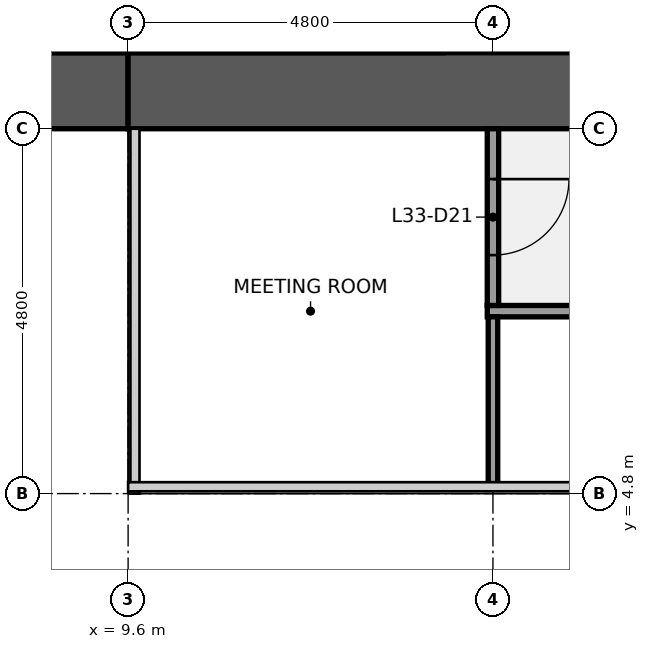
"""IFC4 building model, lengths in metres.
Left out: names, types, materials, properties, quantities, classifications, styles, units other than length and angle.
Written with IfcOpenShell. Run it as: python <this file> out.ifc"""

import sys

from ifc_helpers import new_model, si_unit, direction, frame, frame_2d, origin, place, context, subcontext, project, spatial, rectangle, extrude, element, fill, save


model = new_model("IFC4")
c1 = context("Model", 3, precision=1e-05, world=origin(), true_north=direction((0.0, 1.0)))
c2 = subcontext(c1, "Body", "Model", "MODEL_VIEW")
j1 = project(units=[si_unit("LENGTHUNIT", "METRE"), si_unit("PLANEANGLEUNIT", "RADIAN")], contexts=[c1])
p1 = place(None, origin())
s1 = spatial("IfcSite", under=j1, at=p1, CompositionType="ELEMENT")
p2 = place(p1, origin())
s2 = spatial("IfcBuilding", under=s1, at=p2, CompositionType="ELEMENT")
p3 = place(p2, frame((0.0, 0.0, 152.1)))
s3 = spatial("IfcBuildingStorey", under=s2, at=p3, CompositionType="ELEMENT", Elevation=152.1)
p4 = place(p3, frame((9.6, 10.1, 0.0), z_axis=(0.0, 0.0, 1.0), x_axis=(-1.0, 0.0, 0.0)))
e1 = element("IfcWall", 1, at=p4, inside=s3, PredefinedType="SHEAR", context=c2, shape_type="SweptSolid", body=[
    extrude(rectangle(XDim=8.6, YDim=1.0, at=frame_2d((4.3, 0.0))), origin(), (0.0, 0.0, 1.0), 3.84),
])
p5 = place(p4, frame((1.5, 0.0, 0.9)))
e2 = element("IfcOpeningElement", 2, at=p5, cuts=e1, PredefinedType="OPENING", context=c2, shape_type="SweptSolid", body=[
    extrude(rectangle(XDim=1.8, YDim=1.5, at=frame_2d((0.9, 0.75))), frame((0.0, 0.51, 0.0), z_axis=(0.0, -1.0, 0.0), x_axis=(1.0, 0.0, 0.0)), (0.0, 0.0, 1.0), 1.02),
])
p6 = place(p3, frame((18.2, 10.1, 0.0), z_axis=(0.0, 0.0, 1.0), x_axis=(-1.0, 0.0, 0.0)))
e3 = element("IfcWall", 3, at=p6, inside=s3, PredefinedType="SHEAR", context=c2, shape_type="SweptSolid", body=[
    extrude(rectangle(XDim=8.6, YDim=1.0, at=frame_2d((4.3, 0.0))), origin(), (0.0, 0.0, 1.0), 3.84),
])
p7 = place(p6, frame((0.85, 0.0, 0.0)))
e4 = element("IfcOpeningElement", 4, at=p7, cuts=e3, PredefinedType="OPENING", context=c2, shape_type="SweptSolid", body=[
    extrude(rectangle(XDim=1.1, YDim=2.1, at=frame_2d((0.55, 1.05))), frame((0.0, 0.51, 0.0), z_axis=(0.0, -1.0, 0.0), x_axis=(1.0, 0.0, 0.0)), (0.0, 0.0, 1.0), 1.02),
])
p8 = place(p3, frame((6.25, 10.7, 0.0), z_axis=(0.0, 0.0, 1.0), x_axis=(1.0, 0.0, 0.0)))
e5 = element("IfcWall", 5, at=p8, inside=s3, PredefinedType="SHEAR", context=c2, shape_type="SweptSolid", body=[
    extrude(rectangle(XDim=3.35, YDim=0.2, at=frame_2d((1.675, 0.0))), origin(), (0.0, 0.0, 1.0), 3.84),
])
p9 = place(p3, frame((9.6, 10.7, 0.0), z_axis=(0.0, 0.0, 1.0), x_axis=(1.0, 0.0, 0.0)))
e6 = element("IfcWall", 6, at=p9, inside=s3, PredefinedType="SHEAR", context=c2, shape_type="SweptSolid", body=[
    extrude(rectangle(XDim=4.15, YDim=0.2, at=frame_2d((2.075, 0.0))), origin(), (0.0, 0.0, 1.0), 3.84),
])
p10 = place(p3, frame((14.325, 7.2, 0.0), z_axis=(0.0, 0.0, 1.0), x_axis=(1.0, 0.0, 0.0)))
e7 = element("IfcWall", 7, at=p10, inside=s3, PredefinedType="PARTITIONING", context=c2, shape_type="SweptSolid", body=[
    extrude(rectangle(XDim=28.95, YDim=0.15, at=frame_2d((14.475, 0.0))), origin(), (0.0, 0.0, 1.0), 2.936),
])
p11 = place(p10, frame((1.975, 0.0, 0.0)))
e8 = element("IfcOpeningElement", 8, at=p11, cuts=e7, PredefinedType="OPENING", context=c2, shape_type="SweptSolid", body=[
    extrude(rectangle(XDim=1.0, YDim=2.1, at=frame_2d((0.5, 1.05))), frame((0.0, 0.085, 0.0), z_axis=(0.0, -1.0, 0.0), x_axis=(1.0, 0.0, 0.0)), (0.0, 0.0, 1.0), 0.17),
])
p12 = place(p10, frame((5.575, 0.0, 0.0)))
e9 = element("IfcOpeningElement", 9, at=p12, cuts=e7, PredefinedType="OPENING", context=c2, shape_type="SweptSolid", body=[
    extrude(rectangle(XDim=1.0, YDim=2.1, at=frame_2d((0.5, 1.05))), frame((0.0, 0.085, 0.0), z_axis=(0.0, -1.0, 0.0), x_axis=(1.0, 0.0, 0.0)), (0.0, 0.0, 1.0), 0.17),
])
p13 = place(p10, frame((9.175, 0.0, 0.0)))
e10 = element("IfcOpeningElement", 10, at=p13, cuts=e7, PredefinedType="OPENING", context=c2, shape_type="SweptSolid", body=[
    extrude(rectangle(XDim=1.0, YDim=2.1, at=frame_2d((0.5, 1.05))), frame((0.0, 0.085, 0.0), z_axis=(0.0, -1.0, 0.0), x_axis=(1.0, 0.0, 0.0)), (0.0, 0.0, 1.0), 0.17),
])
p14 = place(p10, frame((12.775, 0.0, 0.0)))
e11 = element("IfcOpeningElement", 11, at=p14, cuts=e7, PredefinedType="OPENING", context=c2, shape_type="SweptSolid", body=[
    extrude(rectangle(XDim=1.0, YDim=2.1, at=frame_2d((0.5, 1.05))), frame((0.0, 0.085, 0.0), z_axis=(0.0, -1.0, 0.0), x_axis=(1.0, 0.0, 0.0)), (0.0, 0.0, 1.0), 0.17),
])
p15 = place(p10, frame((18.775, 0.0, 0.0)))
e12 = element("IfcOpeningElement", 12, at=p15, cuts=e7, PredefinedType="OPENING", context=c2, shape_type="SweptSolid", body=[
    extrude(rectangle(XDim=1.0, YDim=2.1, at=frame_2d((0.5, 1.05))), frame((0.0, 0.085, 0.0), z_axis=(0.0, -1.0, 0.0), x_axis=(1.0, 0.0, 0.0)), (0.0, 0.0, 1.0), 0.17),
])
p16 = place(p10, frame((25.975, 0.0, 0.0)))
e13 = element("IfcOpeningElement", 13, at=p16, cuts=e7, PredefinedType="OPENING", context=c2, shape_type="SweptSolid", body=[
    extrude(rectangle(XDim=1.0, YDim=2.1, at=frame_2d((0.5, 1.05))), frame((0.0, 0.085, 0.0), z_axis=(0.0, -1.0, 0.0), x_axis=(1.0, 0.0, 0.0)), (0.0, 0.0, 1.0), 0.17),
])
p17 = place(p3, frame((14.4, 4.9, 0.0), z_axis=(0.0, 0.0, 1.0), x_axis=(0.0, 1.0, 0.0)))
e14 = element("IfcWall", 14, at=p17, inside=s3, PredefinedType="PARTITIONING", context=c2, shape_type="SweptSolid", body=[
    extrude(rectangle(XDim=2.225, YDim=0.125, at=frame_2d((1.113, 0.0))), origin(), (0.0, 0.0, 1.0), 2.936),
])
p18 = place(p3, frame((14.4, 7.275, 0.0), z_axis=(0.0, 0.0, 1.0), x_axis=(0.0, 1.0, 0.0)))
e15 = element("IfcWall", 15, at=p18, inside=s3, PredefinedType="PARTITIONING", context=c2, shape_type="SweptSolid", body=[
    extrude(rectangle(XDim=2.325, YDim=0.15, at=frame_2d((1.163, 0.0))), origin(), (0.0, 0.0, 1.0), 2.936),
])
p19 = place(p18, frame((0.663, 0.0, 0.0)))
e16 = element("IfcOpeningElement", 16, at=p19, cuts=e15, PredefinedType="OPENING", context=c2, shape_type="SweptSolid", body=[
    extrude(rectangle(XDim=1.0, YDim=2.1, at=frame_2d((0.5, 1.05))), frame((0.0, 0.085, 0.0), z_axis=(0.0, -1.0, 0.0), x_axis=(1.0, 0.0, 0.0)), (0.0, 0.0, 1.0), 0.17),
])
p20 = place(p19, origin())
e17 = element("IfcDoor", 17, at=p20, inside=s3, OperationType="SINGLE_SWING_RIGHT", PredefinedType="DOOR", context=c2, shape_type="SweptSolid", body=[
    extrude(rectangle(XDim=1.0, YDim=2.1, at=frame_2d((0.5, 1.05))), frame((0.0, 0.025, 0.0), z_axis=(0.0, -1.0, 0.0), x_axis=(1.0, 0.0, 0.0)), (0.0, 0.0, 1.0), 0.05),
])
fill(e16, e17)
save(model, sys.argv[1])
